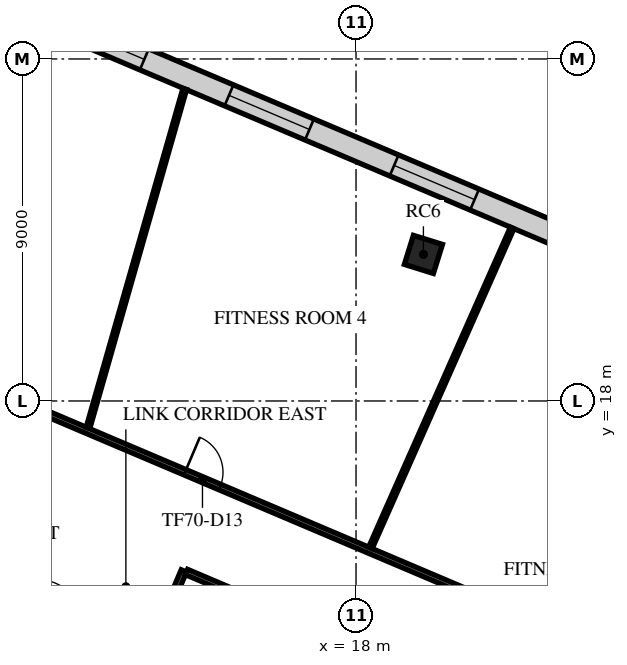
"""IFC4 building model, lengths in metres.
Left out: names, types, materials, properties, quantities, classifications, styles, units other than length and angle.
Written with IfcOpenShell. Run it as: python <this file> out.ifc"""

import sys

from ifc_helpers import new_model, si_unit, direction, frame, frame_2d, origin, origin_2d, place, context, subcontext, project, spatial, rectangle, extrude, element, fill, save


model = new_model("IFC4")
c1 = context("Model", 3, precision=1e-05, world=origin(), true_north=direction((0.0, 1.0)))
c2 = subcontext(c1, "Body", "Model", "MODEL_VIEW")
j1 = project(units=[si_unit("LENGTHUNIT", "METRE"), si_unit("PLANEANGLEUNIT", "RADIAN")], contexts=[c1])
p1 = place(None, origin())
s1 = spatial("IfcSite", under=j1, at=p1, CompositionType="ELEMENT")
p2 = place(p1, origin())
s2 = spatial("IfcBuilding", under=s1, at=p2, CompositionType="ELEMENT")
p3 = place(p2, frame((0.0, 0.0, 300.5)))
s3 = spatial("IfcBuildingStorey", under=s2, at=p3, CompositionType="ELEMENT", Elevation=300.5)
p4 = place(p3, frame((19.773, 21.857, 0.0), z_axis=(0.0, 0.0, 1.0), x_axis=(0.297503182032, 0.954720826567, 0.0)))
e1 = element("IfcColumn", 1, at=p4, inside=s3, PredefinedType="COLUMN", context=c2, shape_type="SweptSolid", body=[
    extrude(rectangle(XDim=0.8, YDim=0.8, at=origin_2d()), origin(), (0.0, 0.0, 1.0), 4.0),
])
p5 = place(p3, frame((30.926, 19.138, 0.0), z_axis=(0.0, 0.0, 1.0), x_axis=(-0.920504263443, 0.390732518462, 0.0)))
e2 = element("IfcWall", 2, at=p5, inside=s3, PredefinedType="STANDARD", context=c2, shape_type="SweptSolid", body=[
    extrude(rectangle(XDim=42.49, YDim=0.6, at=frame_2d((21.245, 0.0))), origin(), (0.0, 0.0, 1.0), 3.65),
])
p6 = place(p5, frame((1.21, 0.0, 0.9)))
e3 = element("IfcOpeningElement", 3, at=p6, cuts=e2, PredefinedType="OPENING", context=c2, shape_type="SweptSolid", body=[
    extrude(rectangle(XDim=2.3, YDim=2.1, at=frame_2d((1.15, 1.05))), frame((0.0, 0.31, 0.0), z_axis=(0.0, -1.0, 0.0), x_axis=(1.0, 0.0, 0.0)), (0.0, 0.0, 1.0), 0.62),
])
p7 = place(p5, frame((5.932, 0.0, 0.9)))
e4 = element("IfcOpeningElement", 4, at=p7, cuts=e2, PredefinedType="OPENING", context=c2, shape_type="SweptSolid", body=[
    extrude(rectangle(XDim=2.3, YDim=2.1, at=frame_2d((1.15, 1.05))), frame((0.0, 0.31, 0.0), z_axis=(0.0, -1.0, 0.0), x_axis=(1.0, 0.0, 0.0)), (0.0, 0.0, 1.0), 0.62),
])
p8 = place(p5, frame((10.653, 0.0, 0.9)))
e5 = element("IfcOpeningElement", 5, at=p8, cuts=e2, PredefinedType="OPENING", context=c2, shape_type="SweptSolid", body=[
    extrude(rectangle(XDim=2.3, YDim=2.1, at=frame_2d((1.15, 1.05))), frame((0.0, 0.31, 0.0), z_axis=(0.0, -1.0, 0.0), x_axis=(1.0, 0.0, 0.0)), (0.0, 0.0, 1.0), 0.62),
])
p9 = place(p5, frame((15.374, 0.0, 0.9)))
e6 = element("IfcOpeningElement", 6, at=p9, cuts=e2, PredefinedType="OPENING", context=c2, shape_type="SweptSolid", body=[
    extrude(rectangle(XDim=2.3, YDim=2.1, at=frame_2d((1.15, 1.05))), frame((0.0, 0.31, 0.0), z_axis=(0.0, -1.0, 0.0), x_axis=(1.0, 0.0, 0.0)), (0.0, 0.0, 1.0), 0.62),
])
p10 = place(p5, frame((20.095, 0.0, 0.9)))
e7 = element("IfcOpeningElement", 7, at=p10, cuts=e2, PredefinedType="OPENING", context=c2, shape_type="SweptSolid", body=[
    extrude(rectangle(XDim=2.3, YDim=2.1, at=frame_2d((1.15, 1.05))), frame((0.0, 0.31, 0.0), z_axis=(0.0, -1.0, 0.0), x_axis=(1.0, 0.0, 0.0)), (0.0, 0.0, 1.0), 0.62),
])
p11 = place(p5, frame((24.816, 0.0, 0.9)))
e8 = element("IfcOpeningElement", 8, at=p11, cuts=e2, PredefinedType="OPENING", context=c2, shape_type="SweptSolid", body=[
    extrude(rectangle(XDim=2.3, YDim=2.1, at=frame_2d((1.15, 1.05))), frame((0.0, 0.31, 0.0), z_axis=(0.0, -1.0, 0.0), x_axis=(1.0, 0.0, 0.0)), (0.0, 0.0, 1.0), 0.62),
])
p12 = place(p5, frame((29.537, 0.0, 0.9)))
e9 = element("IfcOpeningElement", 9, at=p12, cuts=e2, PredefinedType="OPENING", context=c2, shape_type="SweptSolid", body=[
    extrude(rectangle(XDim=2.3, YDim=2.1, at=frame_2d((1.15, 1.05))), frame((0.0, 0.31, 0.0), z_axis=(0.0, -1.0, 0.0), x_axis=(1.0, 0.0, 0.0)), (0.0, 0.0, 1.0), 0.62),
])
p13 = place(p5, frame((34.258, 0.0, 0.9)))
e10 = element("IfcOpeningElement", 10, at=p13, cuts=e2, PredefinedType="OPENING", context=c2, shape_type="SweptSolid", body=[
    extrude(rectangle(XDim=2.3, YDim=2.1, at=frame_2d((1.15, 1.05))), frame((0.0, 0.31, 0.0), z_axis=(0.0, -1.0, 0.0), x_axis=(1.0, 0.0, 0.0)), (0.0, 0.0, 1.0), 0.62),
])
p14 = place(p5, frame((38.979, 0.0, 0.9)))
e11 = element("IfcOpeningElement", 11, at=p14, cuts=e2, PredefinedType="OPENING", context=c2, shape_type="SweptSolid", body=[
    extrude(rectangle(XDim=2.3, YDim=2.1, at=frame_2d((1.15, 1.05))), frame((0.0, 0.31, 0.0), z_axis=(0.0, -1.0, 0.0), x_axis=(1.0, 0.0, 0.0)), (0.0, 0.0, 1.0), 0.62),
])
p15 = place(p3, frame((-8.176, 25.325, 0.0), z_axis=(0.0, 0.0, 1.0), x_axis=(0.920507643781, -0.390724554821, 0.0)))
e12 = element("IfcWall", 12, at=p15, inside=s3, PredefinedType="PARTITIONING", context=c2, shape_type="SweptSolid", body=[
    extrude(rectangle(XDim=34.917, YDim=0.15, at=frame_2d((17.458, 0.0))), origin(), (0.0, 0.0, 1.0), 3.25),
])
p16 = place(p15, frame((5.55, 0.0, 0.0)))
e13 = element("IfcOpeningElement", 13, at=p16, cuts=e12, PredefinedType="OPENING", context=c2, shape_type="SweptSolid", body=[
    extrude(rectangle(XDim=1.8, YDim=2.1, at=frame_2d((0.9, 1.05))), frame((0.0, 0.085, 0.0), z_axis=(0.0, -1.0, 0.0), x_axis=(1.0, 0.0, 0.0)), (0.0, 0.0, 1.0), 0.17),
])
p17 = place(p15, frame((1.05, 0.0, 0.0)))
e14 = element("IfcOpeningElement", 14, at=p17, cuts=e12, PredefinedType="OPENING", context=c2, shape_type="SweptSolid", body=[
    extrude(rectangle(XDim=1.0, YDim=2.1, at=frame_2d((0.5, 1.05))), frame((0.0, 0.085, 0.0), z_axis=(0.0, -1.0, 0.0), x_axis=(1.0, 0.0, 0.0)), (0.0, 0.0, 1.0), 0.17),
])
p18 = place(p15, frame((16.098, 0.0, 0.0)))
e15 = element("IfcOpeningElement", 15, at=p18, cuts=e12, PredefinedType="OPENING", context=c2, shape_type="SweptSolid", body=[
    extrude(rectangle(XDim=1.0, YDim=2.1, at=frame_2d((0.5, 1.05))), frame((0.0, 0.085, 0.0), z_axis=(0.0, -1.0, 0.0), x_axis=(1.0, 0.0, 0.0)), (0.0, 0.0, 1.0), 0.17),
])
p19 = place(p15, frame((23.547, 0.0, 0.0)))
e16 = element("IfcOpeningElement", 16, at=p19, cuts=e12, PredefinedType="OPENING", context=c2, shape_type="SweptSolid", body=[
    extrude(rectangle(XDim=1.0, YDim=2.1, at=frame_2d((0.5, 1.05))), frame((0.0, 0.085, 0.0), z_axis=(0.0, -1.0, 0.0), x_axis=(1.0, 0.0, 0.0)), (0.0, 0.0, 1.0), 0.17),
])
p20 = place(p3, frame((13.035, 12.504, 0.0), z_axis=(0.0, 0.0, 1.0), x_axis=(0.390634335845, 0.920545933487, 0.0)))
e17 = element("IfcWall", 17, at=p20, inside=s3, PredefinedType="PARTITIONING", context=c2, shape_type="SweptSolid", body=[
    extrude(rectangle(XDim=1.113, YDim=0.15, at=frame_2d((0.557, 0.0))), origin(), (0.0, 0.0, 1.0), 3.13),
])
p21 = place(p3, frame((13.539, 13.5, 0.0), z_axis=(0.0, 0.0, 1.0), x_axis=(0.920505387388, -0.390729870613, 0.0)))
e18 = element("IfcWall", 18, at=p21, inside=s3, PredefinedType="PARTITIONING", context=c2, shape_type="SweptSolid", body=[
    extrude(rectangle(XDim=10.309, YDim=0.15, at=frame_2d((5.154, 0.0))), origin(), (0.0, 0.0, 1.0), 3.25),
])
p22 = place(p3, frame((10.948, 17.296, 0.0), z_axis=(0.0, 0.0, 1.0), x_axis=(0.274428926373, 0.961607385771, 0.0)))
e19 = element("IfcWall", 19, at=p22, inside=s3, PredefinedType="PARTITIONING", context=c2, shape_type="SweptSolid", body=[
    extrude(rectangle(XDim=9.27, YDim=0.1, at=frame_2d((4.635, 0.0))), origin(), (0.0, 0.0, 1.0), 3.65),
])
p23 = place(p3, frame((18.379, 14.135, 0.0), z_axis=(0.0, 0.0, 1.0), x_axis=(0.405094962362, 0.91427461491, 0.0)))
e20 = element("IfcWall", 20, at=p23, inside=s3, PredefinedType="PARTITIONING", context=c2, shape_type="SweptSolid", body=[
    extrude(rectangle(XDim=9.207, YDim=0.1, at=frame_2d((4.603, 0.0))), origin(), (0.0, 0.0, 1.0), 3.25),
])
p24 = place(p8, origin())
e21 = element("IfcWindow", 21, at=p24, inside=s3, PartitioningType="SINGLE_PANEL", PredefinedType="WINDOW", context=c2, shape_type="SweptSolid", body=[
    extrude(rectangle(XDim=2.3, YDim=2.1, at=frame_2d((1.15, 1.05))), frame((0.0, 0.03, 0.0), z_axis=(0.0, -1.0, 0.0), x_axis=(1.0, 0.0, 0.0)), (0.0, 0.0, 1.0), 0.06),
])
fill(e5, e21)
p25 = place(p9, origin())
e22 = element("IfcWindow", 22, at=p25, inside=s3, PartitioningType="SINGLE_PANEL", PredefinedType="WINDOW", context=c2, shape_type="SweptSolid", body=[
    extrude(rectangle(XDim=2.3, YDim=2.1, at=frame_2d((1.15, 1.05))), frame((0.0, 0.03, 0.0), z_axis=(0.0, -1.0, 0.0), x_axis=(1.0, 0.0, 0.0)), (0.0, 0.0, 1.0), 0.06),
])
fill(e6, e22)
p26 = place(p10, origin())
e23 = element("IfcWindow", 23, at=p26, inside=s3, PartitioningType="SINGLE_PANEL", PredefinedType="WINDOW", context=c2, shape_type="SweptSolid", body=[
    extrude(rectangle(XDim=2.3, YDim=2.1, at=frame_2d((1.15, 1.05))), frame((0.0, 0.03, 0.0), z_axis=(0.0, -1.0, 0.0), x_axis=(1.0, 0.0, 0.0)), (0.0, 0.0, 1.0), 0.06),
])
fill(e7, e23)
p27 = place(p19, origin())
e24 = element("IfcDoor", 24, at=p27, inside=s3, OperationType="SINGLE_SWING_RIGHT", PredefinedType="DOOR", context=c2, shape_type="SweptSolid", body=[
    extrude(rectangle(XDim=1.0, YDim=2.1, at=frame_2d((0.5, 1.05))), frame((0.0, 0.025, 0.0), z_axis=(0.0, -1.0, 0.0), x_axis=(1.0, 0.0, 0.0)), (0.0, 0.0, 1.0), 0.05),
])
fill(e16, e24)
save(model, sys.argv[1])
